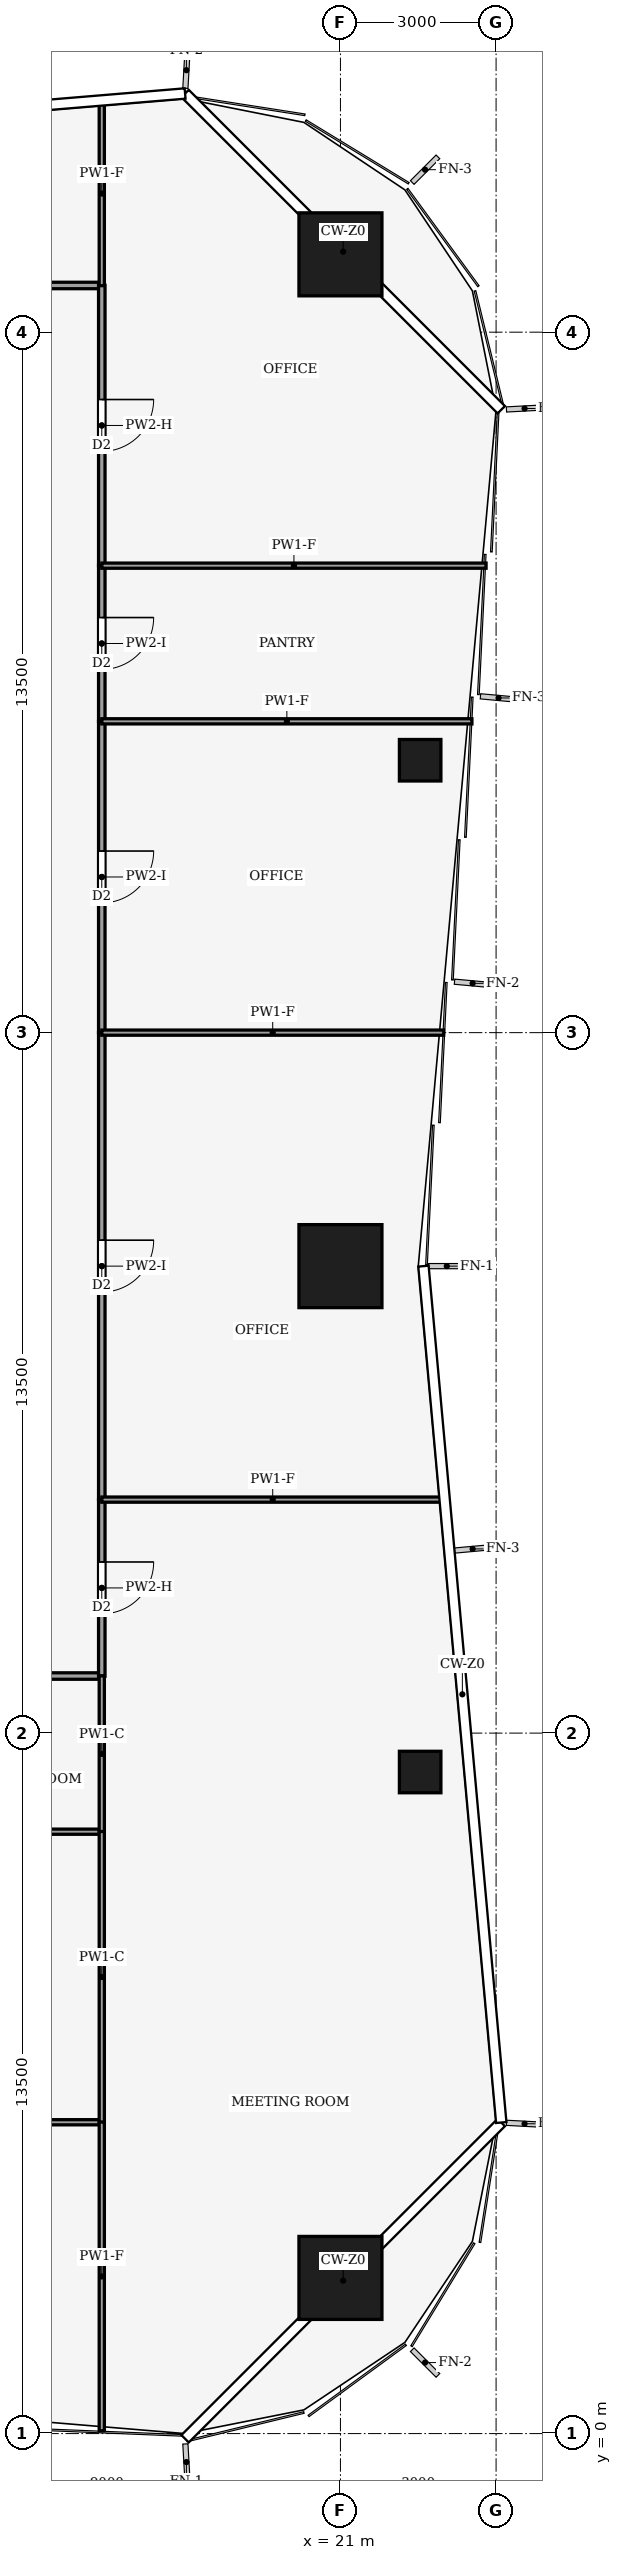
"""IFC4 building model, lengths in metres.
Left out: names, types, materials, properties, quantities, classifications, styles, units other than length and angle.
Written with IfcOpenShell. Run it as: python <this file> out.ifc"""

import sys

from ifc_helpers import new_model, si_unit, direction, frame, frame_2d, origin, origin_2d, place, context, subcontext, project, spatial, rectangle, hollow_rectangle, extrude, element, fill, save


model = new_model("IFC4")
c1 = context("Model", 3, precision=1e-05, world=origin(), true_north=direction((0.0, 1.0)))
c2 = subcontext(c1, "Body", "Model", "MODEL_VIEW")
j1 = project(units=[si_unit("LENGTHUNIT", "METRE"), si_unit("PLANEANGLEUNIT", "RADIAN")], contexts=[c1])
p1 = place(None, origin())
s1 = spatial("IfcSite", under=j1, at=p1, CompositionType="ELEMENT")
p2 = place(p1, origin())
s2 = spatial("IfcBuilding", under=s1, at=p2, CompositionType="ELEMENT")
p3 = place(p2, frame((0.0, 0.0, 26.0)))
s3 = spatial("IfcBuildingStorey", under=s2, at=p3, CompositionType="ELEMENT", Elevation=26.0)
for number, where, z_axis, x_axis in (
    (1, (21.0, 42.0, 0.0), (0.0, 0.0, 1.0), (1.0, 0.0, 0.0)),
    (2, (21.0, 22.5, 0.0), (0.0, 0.0, 1.0), (1.0, 0.0, 0.0)),
    (3, (21.0, 3.0, 0.0), (0.0, 0.0, 1.0), (1.0, 0.0, 0.0)),
):
    element("IfcColumn", number, at=place(p3, frame(where, z_axis=z_axis, x_axis=x_axis)), inside=s3, PredefinedType="COLUMN", context=c2, shape_type="SweptSolid", body=[
        extrude(hollow_rectangle(XDim=1.6, YDim=1.6, WallThickness=0.09, at=origin_2d()), origin(), (0.0, 0.0, 1.0), 4.0),
    ])
for number, where, z_axis, x_axis in (
    (4, (22.536, 12.75, 0.0), (0.0, 0.0, 1.0), (1.0, 0.0, 0.0)),
    (5, (22.536, 32.25, 0.0), (0.0, 0.0, 1.0), (1.0, 0.0, 0.0)),
):
    element("IfcColumn", number, at=place(p3, frame(where, z_axis=z_axis, x_axis=x_axis)), inside=s3, PredefinedType="COLUMN", context=c2, shape_type="SweptSolid", body=[
        extrude(hollow_rectangle(XDim=0.8, YDim=0.8, WallThickness=0.04, at=origin_2d()), origin(), (0.0, 0.0, 1.0), 4.0),
    ])
p4 = place(p3, frame((12.0, 14.6, 0.0), z_axis=(0.0, 0.0, 1.0), x_axis=(1.0, 0.0, 0.0)))
e6 = element("IfcWall", 6, at=p4, inside=s3, PredefinedType="PARTITIONING", context=c2, shape_type="SweptSolid", body=[
    extrude(rectangle(XDim=4.4, YDim=0.125, at=frame_2d((2.2, 0.0))), origin(), (0.0, 0.0, 1.0), 3.29),
])
p5 = place(p3, frame((6.0, 41.4, 0.0), z_axis=(0.0, 0.0, 1.0), x_axis=(1.0, 0.0, 0.0)))
e7 = element("IfcWall", 7, at=p5, inside=s3, PredefinedType="PARTITIONING", context=c2, shape_type="SweptSolid", body=[
    extrude(rectangle(XDim=10.4, YDim=0.125, at=frame_2d((5.2, 0.0))), origin(), (0.0, 0.0, 1.0), 3.54),
])
p6 = place(p5, frame((1.9, 0.0, 0.0)))
e8 = element("IfcOpeningElement", 8, at=p6, cuts=e7, PredefinedType="OPENING", context=c2, shape_type="SweptSolid", body=[
    extrude(rectangle(XDim=1.0, YDim=2.1, at=frame_2d((0.5, 1.05))), frame((0.0, 0.073, 0.0), z_axis=(0.0, -1.0, 0.0), x_axis=(1.0, 0.0, 0.0)), (0.0, 0.0, 1.0), 0.145),
])
p7 = place(p3, frame((16.4, 18.0, 0.0), z_axis=(0.0, 0.0, 1.0), x_axis=(0.0, -1.0, 0.0)))
e9 = element("IfcWall", 9, at=p7, inside=s3, PredefinedType="PARTITIONING", context=c2, shape_type="SweptSolid", body=[
    extrude(rectangle(XDim=3.404, YDim=0.125, at=frame_2d((1.702, 0.0))), origin(), (0.0, 0.0, 1.0), 3.14),
])
p8 = place(p7, frame((1.202, 0.0, 0.0)))
e10 = element("IfcOpeningElement", 10, at=p8, cuts=e9, PredefinedType="OPENING", context=c2, shape_type="SweptSolid", body=[
    extrude(rectangle(XDim=1.0, YDim=2.1, at=frame_2d((0.5, 1.05))), frame((0.0, 0.073, 0.0), z_axis=(0.0, -1.0, 0.0), x_axis=(1.0, 0.0, 0.0)), (0.0, 0.0, 1.0), 0.145),
])
p9 = place(p3, frame((16.4, 27.0, 0.0), z_axis=(0.0, 0.0, 1.0), x_axis=(0.0, -1.0, 0.0)))
e11 = element("IfcWall", 11, at=p9, inside=s3, PredefinedType="PARTITIONING", context=c2, shape_type="SweptSolid", body=[
    extrude(rectangle(XDim=9.0, YDim=0.125, at=frame_2d((4.5, 0.0))), origin(), (0.0, 0.0, 1.0), 3.48),
])
p10 = place(p9, frame((4.0, 0.0, 0.0)))
e12 = element("IfcOpeningElement", 12, at=p10, cuts=e11, PredefinedType="OPENING", context=c2, shape_type="SweptSolid", body=[
    extrude(rectangle(XDim=1.0, YDim=2.1, at=frame_2d((0.5, 1.05))), frame((0.0, 0.073, 0.0), z_axis=(0.0, -1.0, 0.0), x_axis=(1.0, 0.0, 0.0)), (0.0, 0.0, 1.0), 0.145),
])
p11 = place(p3, frame((16.4, 33.0, 0.0), z_axis=(0.0, 0.0, 1.0), x_axis=(0.0, -1.0, 0.0)))
e13 = element("IfcWall", 13, at=p11, inside=s3, PredefinedType="PARTITIONING", context=c2, shape_type="SweptSolid", body=[
    extrude(rectangle(XDim=6.0, YDim=0.125, at=frame_2d((3.0, 0.0))), origin(), (0.0, 0.0, 1.0), 3.48),
])
p12 = place(p11, frame((2.5, 0.0, 0.0)))
e14 = element("IfcOpeningElement", 14, at=p12, cuts=e13, PredefinedType="OPENING", context=c2, shape_type="SweptSolid", body=[
    extrude(rectangle(XDim=1.0, YDim=2.1, at=frame_2d((0.5, 1.05))), frame((0.0, 0.073, 0.0), z_axis=(0.0, -1.0, 0.0), x_axis=(1.0, 0.0, 0.0)), (0.0, 0.0, 1.0), 0.145),
])
p13 = place(p3, frame((16.4, 36.0, 0.0), z_axis=(0.0, 0.0, 1.0), x_axis=(0.0, -1.0, 0.0)))
e15 = element("IfcWall", 15, at=p13, inside=s3, PredefinedType="PARTITIONING", context=c2, shape_type="SweptSolid", body=[
    extrude(rectangle(XDim=3.0, YDim=0.125, at=frame_2d((1.5, 0.0))), origin(), (0.0, 0.0, 1.0), 3.48),
])
p14 = place(p13, frame((1.0, 0.0, 0.0)))
e16 = element("IfcOpeningElement", 16, at=p14, cuts=e15, PredefinedType="OPENING", context=c2, shape_type="SweptSolid", body=[
    extrude(rectangle(XDim=1.0, YDim=2.1, at=frame_2d((0.5, 1.05))), frame((0.0, 0.073, 0.0), z_axis=(0.0, -1.0, 0.0), x_axis=(1.0, 0.0, 0.0)), (0.0, 0.0, 1.0), 0.145),
])
p15 = place(p3, frame((16.4, 41.404, 0.0), z_axis=(0.0, 0.0, 1.0), x_axis=(0.0, -1.0, 0.0)))
e17 = element("IfcWall", 17, at=p15, inside=s3, PredefinedType="PARTITIONING", context=c2, shape_type="SweptSolid", body=[
    extrude(rectangle(XDim=5.404, YDim=0.125, at=frame_2d((2.702, 0.0))), origin(), (0.0, 0.0, 1.0), 3.14),
])
p16 = place(p15, frame((2.202, 0.0, 0.0)))
e18 = element("IfcOpeningElement", 18, at=p16, cuts=e17, PredefinedType="OPENING", context=c2, shape_type="SweptSolid", body=[
    extrude(rectangle(XDim=1.0, YDim=2.1, at=frame_2d((0.5, 1.05))), frame((0.0, 0.073, 0.0), z_axis=(0.0, -1.0, 0.0), x_axis=(1.0, 0.0, 0.0)), (0.0, 0.0, 1.0), 0.145),
])
p17 = place(p3, frame((11.996, 11.6, 0.0), z_axis=(0.0, 0.0, 1.0), x_axis=(1.0, 0.0, 0.0)))
e19 = element("IfcWall", 19, at=p17, inside=s3, PredefinedType="PARTITIONING", context=c2, shape_type="SweptSolid", body=[
    extrude(rectangle(XDim=4.404, YDim=0.1, at=frame_2d((2.202, 0.0))), origin(), (0.0, 0.0, 1.0), 3.29),
])
p18 = place(p3, frame((16.4, 11.596, 0.0), z_axis=(0.0, 0.0, 1.0), x_axis=(0.0, 1.0, 0.0)))
e20 = element("IfcWall", 20, at=p18, inside=s3, PredefinedType="PARTITIONING", context=c2, shape_type="SweptSolid", body=[
    extrude(rectangle(XDim=3.008, YDim=0.1, at=frame_2d((1.504, 0.0))), origin(), (0.0, 0.0, 1.0), 3.87),
])
p19 = place(p3, frame((16.4, 6.0, 0.0), z_axis=(0.0, 0.0, 1.0), x_axis=(-1.0, 0.0, 0.0)))
e21 = element("IfcWall", 21, at=p19, inside=s3, PredefinedType="PARTITIONING", context=c2, shape_type="SweptSolid", body=[
    extrude(rectangle(XDim=7.4, YDim=0.1, at=frame_2d((3.7, 0.0))), origin(), (0.0, 0.0, 1.0), 3.29),
])
p20 = place(p19, frame((3.2, 0.0, 0.0)))
e22 = element("IfcOpeningElement", 22, at=p20, cuts=e21, PredefinedType="OPENING", context=c2, shape_type="SweptSolid", body=[
    extrude(rectangle(XDim=1.0, YDim=2.1, at=frame_2d((0.5, 1.05))), frame((0.0, 0.06, 0.0), z_axis=(0.0, -1.0, 0.0), x_axis=(1.0, 0.0, 0.0)), (0.0, 0.0, 1.0), 0.12),
])
p21 = place(p3, frame((16.4, 5.996, 0.0), z_axis=(0.0, 0.0, 1.0), x_axis=(0.0, 1.0, 0.0)))
e23 = element("IfcWall", 23, at=p21, inside=s3, PredefinedType="PARTITIONING", context=c2, shape_type="SweptSolid", body=[
    extrude(rectangle(XDim=5.608, YDim=0.1, at=frame_2d((2.804, 0.0))), origin(), (0.0, 0.0, 1.0), 3.87),
])
p22 = place(p3, frame((16.4, 0.053, 0.0), z_axis=(0.0, 0.0, 1.0), x_axis=(0.0, 1.0, 0.0)))
e24 = element("IfcWall", 24, at=p22, inside=s3, PredefinedType="PARTITIONING", context=c2, shape_type="SweptSolid", body=[
    extrude(rectangle(XDim=5.951, YDim=0.1, at=frame_2d((2.975, 0.0))), origin(), (0.0, 0.0, 1.0), 3.04),
])
p23 = place(p3, frame((16.4, 41.396, 0.0), z_axis=(0.0, 0.0, 1.0), x_axis=(0.0, 1.0, 0.0)))
e25 = element("IfcWall", 25, at=p23, inside=s3, PredefinedType="PARTITIONING", context=c2, shape_type="SweptSolid", body=[
    extrude(rectangle(XDim=3.551, YDim=0.1, at=frame_2d((1.775, 0.0))), origin(), (0.0, 0.0, 1.0), 3.04),
])
for number, where, z_axis, x_axis in (
    (26, (22.989, 18.0, 0.0), (0.0, 0.0, 1.0), (-1.0, 0.0, 0.0)),
    (27, (22.989, 27.0, 0.0), (0.0, 0.0, 1.0), (-1.0, 0.0, 0.0)),
):
    element("IfcWall", number, at=place(p3, frame(where, z_axis=z_axis, x_axis=x_axis)), inside=s3, PredefinedType="PARTITIONING", context=c2, shape_type="SweptSolid", body=[
        extrude(rectangle(XDim=6.589, YDim=0.1, at=frame_2d((3.294, 0.0))), origin(), (0.0, 0.0, 1.0), 3.04),
    ])
p24 = place(p3, frame((23.534, 33.0, 0.0), z_axis=(0.0, 0.0, 1.0), x_axis=(-1.0, 0.0, 0.0)))
e28 = element("IfcWall", 28, at=p24, inside=s3, PredefinedType="PARTITIONING", context=c2, shape_type="SweptSolid", body=[
    extrude(rectangle(XDim=7.135, YDim=0.1, at=frame_2d((3.567, 0.0))), origin(), (0.0, 0.0, 1.0), 3.04),
])
p25 = place(p3, frame((23.807, 36.0, 0.0), z_axis=(0.0, 0.0, 1.0), x_axis=(-1.0, 0.0, 0.0)))
e29 = element("IfcWall", 29, at=p25, inside=s3, PredefinedType="PARTITIONING", context=c2, shape_type="SweptSolid", body=[
    extrude(rectangle(XDim=7.407, YDim=0.1, at=frame_2d((3.704, 0.0))), origin(), (0.0, 0.0, 1.0), 3.04),
])
p26 = place(p8, origin())
e30 = element("IfcDoor", 30, at=p26, inside=s3, OperationType="SINGLE_SWING_LEFT", PredefinedType="DOOR", context=c2, shape_type="SweptSolid", body=[
    extrude(rectangle(XDim=1.0, YDim=2.1, at=frame_2d((0.5, 1.05))), frame((0.0, 0.025, 0.0), z_axis=(0.0, -1.0, 0.0), x_axis=(1.0, 0.0, 0.0)), (0.0, 0.0, 1.0), 0.05),
])
fill(e10, e30)
p27 = place(p10, origin())
e31 = element("IfcDoor", 31, at=p27, inside=s3, OperationType="SINGLE_SWING_RIGHT", PredefinedType="DOOR", context=c2, shape_type="SweptSolid", body=[
    extrude(rectangle(XDim=1.0, YDim=2.1, at=frame_2d((0.5, 1.05))), frame((0.0, 0.025, 0.0), z_axis=(0.0, -1.0, 0.0), x_axis=(1.0, 0.0, 0.0)), (0.0, 0.0, 1.0), 0.05),
])
fill(e12, e31)
p28 = place(p12, origin())
e32 = element("IfcDoor", 32, at=p28, inside=s3, OperationType="SINGLE_SWING_LEFT", PredefinedType="DOOR", context=c2, shape_type="SweptSolid", body=[
    extrude(rectangle(XDim=1.0, YDim=2.1, at=frame_2d((0.5, 1.05))), frame((0.0, 0.025, 0.0), z_axis=(0.0, -1.0, 0.0), x_axis=(1.0, 0.0, 0.0)), (0.0, 0.0, 1.0), 0.05),
])
fill(e14, e32)
p29 = place(p14, origin())
e33 = element("IfcDoor", 33, at=p29, inside=s3, OperationType="SINGLE_SWING_RIGHT", PredefinedType="DOOR", context=c2, shape_type="SweptSolid", body=[
    extrude(rectangle(XDim=1.0, YDim=2.1, at=frame_2d((0.5, 1.05))), frame((0.0, 0.025, 0.0), z_axis=(0.0, -1.0, 0.0), x_axis=(1.0, 0.0, 0.0)), (0.0, 0.0, 1.0), 0.05),
])
fill(e16, e33)
p30 = place(p16, origin())
e34 = element("IfcDoor", 34, at=p30, inside=s3, OperationType="SINGLE_SWING_LEFT", PredefinedType="DOOR", context=c2, shape_type="SweptSolid", body=[
    extrude(rectangle(XDim=1.0, YDim=2.1, at=frame_2d((0.5, 1.05))), frame((0.0, 0.025, 0.0), z_axis=(0.0, -1.0, 0.0), x_axis=(1.0, 0.0, 0.0)), (0.0, 0.0, 1.0), 0.05),
])
fill(e18, e34)
save(model, sys.argv[1])
